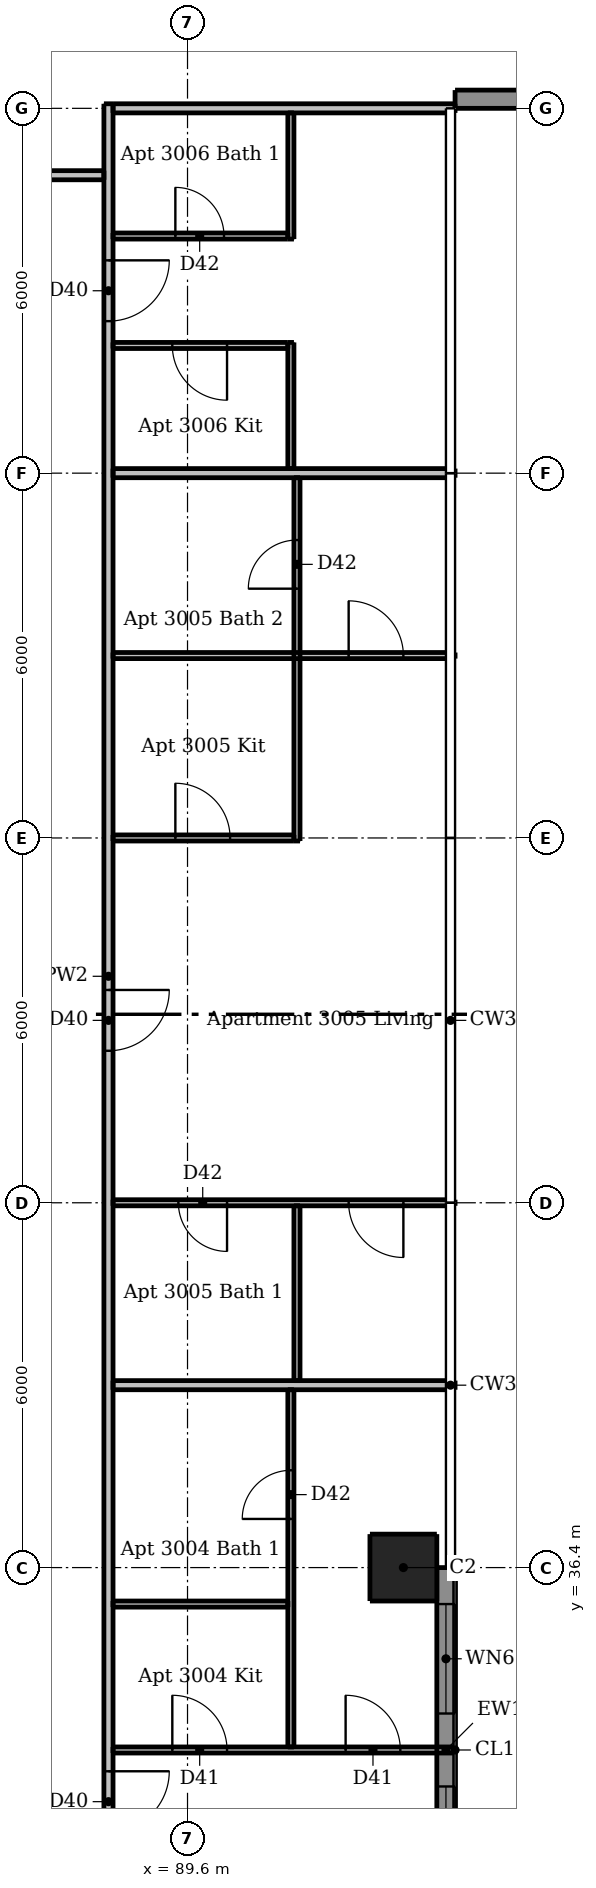
"""IFC4 building model, lengths in metres.
Left out: names, types, materials, properties, quantities, classifications, styles, units other than length and angle.
Written with IfcOpenShell. Run it as: python <this file> out.ifc"""

import sys

from ifc_helpers import new_model, si_unit, direction, frame, frame_2d, origin, origin_2d, place, context, subcontext, project, spatial, rectangle, extrude, element, fill, save


model = new_model("IFC4")
c1 = context("Model", 3, precision=1e-05, world=origin(), true_north=direction((0.0, 1.0)))
c2 = subcontext(c1, "Body", "Model", "MODEL_VIEW")
j1 = project(units=[si_unit("LENGTHUNIT", "METRE"), si_unit("PLANEANGLEUNIT", "RADIAN")], contexts=[c1])
p1 = place(None, origin())
s1 = spatial("IfcSite", under=j1, at=p1, CompositionType="ELEMENT")
p2 = place(p1, origin())
s2 = spatial("IfcBuilding", under=s1, at=p2, CompositionType="ELEMENT")
p3 = place(p2, frame((0.0, 0.0, 111.7)))
s3 = spatial("IfcBuildingStorey", under=s2, at=p3, CompositionType="ELEMENT", Elevation=111.7)
p4 = place(p3, frame((93.15, 36.4, 0.0), z_axis=(0.0, 0.0, 1.0), x_axis=(1.0, 0.0, 0.0)))
e1 = element("IfcColumn", 1, at=p4, inside=s3, PredefinedType="COLUMN", context=c2, shape_type="SweptSolid", body=[
    extrude(rectangle(XDim=1.1, YDim=1.1, at=origin_2d()), origin(), (0.0, 0.0, 1.0), 3.05),
])
p5 = place(p3, frame((94.0, 60.55, 0.0), z_axis=(0.0, 0.0, 1.0), x_axis=(1.0, 0.0, 0.0)))
e2 = element("IfcWall", 2, at=p5, inside=s3, PredefinedType="SOLIDWALL", context=c2, shape_type="SweptSolid", body=[
    extrude(rectangle(XDim=4.6, YDim=0.3, at=frame_2d((2.3, 0.0))), origin(), (0.0, 0.0, 1.0), 3.05),
])
p6 = place(p5, frame((1.1, 0.0, 0.15)))
e3 = element("IfcOpeningElement", 3, at=p6, cuts=e2, PredefinedType="OPENING", context=c2, shape_type="SweptSolid", body=[
    extrude(rectangle(XDim=2.4, YDim=2.1, at=frame_2d((1.2, 1.05))), frame((0.0, 0.16, 0.0), z_axis=(0.0, -1.0, 0.0), x_axis=(1.0, 0.0, 0.0)), (0.0, 0.0, 1.0), 0.32),
])
p7 = place(p3, frame((93.85, 30.4, 0.0), z_axis=(0.0, 0.0, 1.0), x_axis=(0.0, 1.0, 0.0)))
e4 = element("IfcWall", 4, at=p7, inside=s3, PredefinedType="SOLIDWALL", context=c2, shape_type="SweptSolid", body=[
    extrude(rectangle(XDim=6.0, YDim=0.3, at=frame_2d((3.0, 0.0))), origin(), (0.0, 0.0, 1.0), 3.05),
])
p8 = place(p7, frame((0.6, 0.0, 0.15)))
e5 = element("IfcOpeningElement", 5, at=p8, cuts=e4, PredefinedType="OPENING", context=c2, shape_type="SweptSolid", body=[
    extrude(rectangle(XDim=1.8, YDim=2.1, at=frame_2d((0.9, 1.05))), frame((0.0, 0.16, 0.0), z_axis=(0.0, -1.0, 0.0), x_axis=(1.0, 0.0, 0.0)), (0.0, 0.0, 1.0), 0.32),
])
p9 = place(p7, frame((3.6, 0.0, 0.15)))
e6 = element("IfcOpeningElement", 6, at=p9, cuts=e4, PredefinedType="OPENING", context=c2, shape_type="SweptSolid", body=[
    extrude(rectangle(XDim=1.8, YDim=2.1, at=frame_2d((0.9, 1.05))), frame((0.0, 0.16, 0.0), z_axis=(0.0, -1.0, 0.0), x_axis=(1.0, 0.0, 0.0)), (0.0, 0.0, 1.0), 0.32),
])
p10 = place(p3, frame((91.3, 33.45, 0.0), z_axis=(0.0, 0.0, 1.0), x_axis=(0.0, 1.0, 0.0)))
e7 = element("IfcWall", 7, at=p10, inside=s3, PredefinedType="PARTITIONING", context=c2, shape_type="SweptSolid", body=[
    extrude(rectangle(XDim=5.875, YDim=0.1, at=frame_2d((2.938, 0.0))), origin(), (0.0, 0.0, 1.0), 3.05),
])
p11 = place(p10, frame((3.75, 0.0, 0.0)))
e8 = element("IfcOpeningElement", 8, at=p11, cuts=e7, PredefinedType="OPENING", context=c2, shape_type="SweptSolid", body=[
    extrude(rectangle(XDim=0.8, YDim=2.1, at=frame_2d((0.4, 1.05))), frame((0.0, 0.06, 0.0), z_axis=(0.0, -1.0, 0.0), x_axis=(1.0, 0.0, 0.0)), (0.0, 0.0, 1.0), 0.12),
])
for number, where, z_axis, x_axis in (
    (9, (91.3, 54.475, 0.0), (0.0, 0.0, 1.0), (0.0, 1.0, 0.0)),
    (10, (91.3, 58.25, 0.0), (0.0, 0.0, 1.0), (0.0, 1.0, 0.0)),
):
    element("IfcWall", number, at=place(p3, frame(where, z_axis=z_axis, x_axis=x_axis)), inside=s3, PredefinedType="PARTITIONING", context=c2, shape_type="SweptSolid", body=[
        extrude(rectangle(XDim=2.075, YDim=0.1, at=frame_2d((1.038, 0.0))), origin(), (0.0, 0.0, 1.0), 3.05),
    ])
p12 = place(p3, frame((91.4, 39.475, 0.0), z_axis=(0.0, 0.0, 1.0), x_axis=(0.0, 1.0, 0.0)))
e11 = element("IfcWall", 11, at=p12, inside=s3, PredefinedType="PARTITIONING", context=c2, shape_type="SweptSolid", body=[
    extrude(rectangle(XDim=2.875, YDim=0.1, at=frame_2d((1.438, 0.0))), origin(), (0.0, 0.0, 1.0), 3.05),
])
p13 = place(p3, frame((91.4, 48.35, 0.0), z_axis=(0.0, 0.0, 1.0), x_axis=(0.0, 1.0, 0.0)))
e12 = element("IfcWall", 12, at=p13, inside=s3, PredefinedType="PARTITIONING", context=c2, shape_type="SweptSolid", body=[
    extrude(rectangle(XDim=5.975, YDim=0.1, at=frame_2d((2.987, 0.0))), origin(), (0.0, 0.0, 1.0), 3.05),
])
p14 = place(p13, frame((4.15, 0.0, 0.0)))
e13 = element("IfcOpeningElement", 13, at=p14, cuts=e12, PredefinedType="OPENING", context=c2, shape_type="SweptSolid", body=[
    extrude(rectangle(XDim=0.8, YDim=2.1, at=frame_2d((0.4, 1.05))), frame((0.0, 0.06, 0.0), z_axis=(0.0, -1.0, 0.0), x_axis=(1.0, 0.0, 0.0)), (0.0, 0.0, 1.0), 0.12),
])
p15 = place(p3, frame((88.375, 58.3, 0.0), z_axis=(0.0, 0.0, 1.0), x_axis=(1.0, 0.0, 0.0)))
e14 = element("IfcWall", 14, at=p15, inside=s3, PredefinedType="PARTITIONING", context=c2, shape_type="SweptSolid", body=[
    extrude(rectangle(XDim=2.875, YDim=0.1, at=frame_2d((1.438, 0.0))), origin(), (0.0, 0.0, 1.0), 3.05),
])
p16 = place(p15, frame((1.025, 0.0, 0.0)))
e15 = element("IfcOpeningElement", 15, at=p16, cuts=e14, PredefinedType="OPENING", context=c2, shape_type="SweptSolid", body=[
    extrude(rectangle(XDim=0.8, YDim=2.1, at=frame_2d((0.4, 1.05))), frame((0.0, 0.06, 0.0), z_axis=(0.0, -1.0, 0.0), x_axis=(1.0, 0.0, 0.0)), (0.0, 0.0, 1.0), 0.12),
])
p17 = place(p3, frame((91.25, 56.5, 0.0), z_axis=(0.0, 0.0, 1.0), x_axis=(-1.0, 0.0, 0.0)))
e16 = element("IfcWall", 16, at=p17, inside=s3, PredefinedType="PARTITIONING", context=c2, shape_type="SweptSolid", body=[
    extrude(rectangle(XDim=2.875, YDim=0.1, at=frame_2d((1.438, 0.0))), origin(), (0.0, 0.0, 1.0), 3.05),
])
p18 = place(p17, frame((1.0, 0.0, 0.0)))
e17 = element("IfcOpeningElement", 17, at=p18, cuts=e16, PredefinedType="OPENING", context=c2, shape_type="SweptSolid", body=[
    extrude(rectangle(XDim=0.9, YDim=2.1, at=frame_2d((0.45, 1.05))), frame((0.0, 0.06, 0.0), z_axis=(0.0, -1.0, 0.0), x_axis=(1.0, 0.0, 0.0)), (0.0, 0.0, 1.0), 0.12),
])
p19 = place(p3, frame((88.375, 51.4, 0.0), z_axis=(0.0, 0.0, 1.0), x_axis=(1.0, 0.0, 0.0)))
e18 = element("IfcWall", 18, at=p19, inside=s3, PredefinedType="PARTITIONING", context=c2, shape_type="SweptSolid", body=[
    extrude(rectangle(XDim=5.625, YDim=0.1, at=frame_2d((2.812, 0.0))), origin(), (0.0, 0.0, 1.0), 3.05),
])
p20 = place(p19, frame((3.875, 0.0, 0.0)))
e19 = element("IfcOpeningElement", 19, at=p20, cuts=e18, PredefinedType="OPENING", context=c2, shape_type="SweptSolid", body=[
    extrude(rectangle(XDim=0.9, YDim=2.1, at=frame_2d((0.45, 1.05))), frame((0.0, 0.06, 0.0), z_axis=(0.0, -1.0, 0.0), x_axis=(1.0, 0.0, 0.0)), (0.0, 0.0, 1.0), 0.12),
])
p21 = place(p3, frame((88.375, 48.4, 0.0), z_axis=(0.0, 0.0, 1.0), x_axis=(1.0, 0.0, 0.0)))
e20 = element("IfcWall", 20, at=p21, inside=s3, PredefinedType="PARTITIONING", context=c2, shape_type="SweptSolid", body=[
    extrude(rectangle(XDim=2.975, YDim=0.1, at=frame_2d((1.488, 0.0))), origin(), (0.0, 0.0, 1.0), 2.516),
])
p22 = place(p21, frame((1.025, 0.0, 0.0)))
e21 = element("IfcOpeningElement", 21, at=p22, cuts=e20, PredefinedType="OPENING", context=c2, shape_type="SweptSolid", body=[
    extrude(rectangle(XDim=0.9, YDim=2.1, at=frame_2d((0.45, 1.05))), frame((0.0, 0.06, 0.0), z_axis=(0.0, -1.0, 0.0), x_axis=(1.0, 0.0, 0.0)), (0.0, 0.0, 1.0), 0.12),
])
p23 = place(p3, frame((94.0, 42.4, 0.0), z_axis=(0.0, 0.0, 1.0), x_axis=(-1.0, 0.0, 0.0)))
e22 = element("IfcWall", 22, at=p23, inside=s3, PredefinedType="PARTITIONING", context=c2, shape_type="SweptSolid", body=[
    extrude(rectangle(XDim=5.625, YDim=0.1, at=frame_2d((2.812, 0.0))), origin(), (0.0, 0.0, 1.0), 2.516),
])
p24 = place(p23, frame((0.85, 0.0, 0.0)))
e23 = element("IfcOpeningElement", 23, at=p24, cuts=e22, PredefinedType="OPENING", context=c2, shape_type="SweptSolid", body=[
    extrude(rectangle(XDim=0.9, YDim=2.1, at=frame_2d((0.45, 1.05))), frame((0.0, 0.06, 0.0), z_axis=(0.0, -1.0, 0.0), x_axis=(1.0, 0.0, 0.0)), (0.0, 0.0, 1.0), 0.12),
])
p25 = place(p23, frame((3.75, 0.0, 0.0)))
e24 = element("IfcOpeningElement", 24, at=p25, cuts=e22, PredefinedType="OPENING", context=c2, shape_type="SweptSolid", body=[
    extrude(rectangle(XDim=0.8, YDim=2.1, at=frame_2d((0.4, 1.05))), frame((0.0, 0.06, 0.0), z_axis=(0.0, -1.0, 0.0), x_axis=(1.0, 0.0, 0.0)), (0.0, 0.0, 1.0), 0.12),
])
p26 = place(p3, frame((88.375, 35.8, 0.0), z_axis=(0.0, 0.0, 1.0), x_axis=(1.0, 0.0, 0.0)))
e25 = element("IfcWall", 25, at=p26, inside=s3, PredefinedType="PARTITIONING", context=c2, shape_type="SweptSolid", body=[
    extrude(rectangle(XDim=2.875, YDim=0.1, at=frame_2d((1.438, 0.0))), origin(), (0.0, 0.0, 1.0), 3.05),
])
p27 = place(p3, frame((88.375, 33.4, 0.0), z_axis=(0.0, 0.0, 1.0), x_axis=(1.0, 0.0, 0.0)))
e26 = element("IfcWall", 26, at=p27, inside=s3, PredefinedType="PARTITIONING", context=c2, shape_type="SweptSolid", body=[
    extrude(rectangle(XDim=5.625, YDim=0.1, at=frame_2d((2.812, 0.0))), origin(), (0.0, 0.0, 1.0), 3.05),
])
p28 = place(p27, frame((0.975, 0.0, 0.0)))
e27 = element("IfcOpeningElement", 27, at=p28, cuts=e26, PredefinedType="OPENING", context=c2, shape_type="SweptSolid", body=[
    extrude(rectangle(XDim=0.9, YDim=2.1, at=frame_2d((0.45, 1.05))), frame((0.0, 0.06, 0.0), z_axis=(0.0, -1.0, 0.0), x_axis=(1.0, 0.0, 0.0)), (0.0, 0.0, 1.0), 0.12),
])
p29 = place(p27, frame((3.825, 0.0, 0.0)))
e28 = element("IfcOpeningElement", 28, at=p29, cuts=e26, PredefinedType="OPENING", context=c2, shape_type="SweptSolid", body=[
    extrude(rectangle(XDim=0.9, YDim=2.1, at=frame_2d((0.45, 1.05))), frame((0.0, 0.06, 0.0), z_axis=(0.0, -1.0, 0.0), x_axis=(1.0, 0.0, 0.0)), (0.0, 0.0, 1.0), 0.12),
])
p30 = place(p3, frame((88.3, 60.475, 0.0), z_axis=(0.0, 0.0, 1.0), x_axis=(0.0, -1.0, 0.0)))
e29 = element("IfcWall", 29, at=p30, inside=s3, PredefinedType="PARTITIONING", context=c2, shape_type="SweptSolid", body=[
    extrude(rectangle(XDim=28.7, YDim=0.15, at=frame_2d((14.35, 0.0))), origin(), (0.0, 0.0, 1.0), 3.05),
])
p31 = place(p30, frame((27.425, 0.0, 0.0)))
e30 = element("IfcOpeningElement", 30, at=p31, cuts=e29, PredefinedType="OPENING", context=c2, shape_type="SweptSolid", body=[
    extrude(rectangle(XDim=1.0, YDim=2.1, at=frame_2d((0.5, 1.05))), frame((0.0, 0.085, 0.0), z_axis=(0.0, -1.0, 0.0), x_axis=(1.0, 0.0, 0.0)), (0.0, 0.0, 1.0), 0.17),
])
p32 = place(p30, frame((14.575, 0.0, 0.0)))
e31 = element("IfcOpeningElement", 31, at=p32, cuts=e29, PredefinedType="OPENING", context=c2, shape_type="SweptSolid", body=[
    extrude(rectangle(XDim=1.0, YDim=2.1, at=frame_2d((0.5, 1.05))), frame((0.0, 0.085, 0.0), z_axis=(0.0, -1.0, 0.0), x_axis=(1.0, 0.0, 0.0)), (0.0, 0.0, 1.0), 0.17),
])
p33 = place(p30, frame((2.575, 0.0, 0.0)))
e32 = element("IfcOpeningElement", 32, at=p33, cuts=e29, PredefinedType="OPENING", context=c2, shape_type="SweptSolid", body=[
    extrude(rectangle(XDim=1.0, YDim=2.1, at=frame_2d((0.5, 1.05))), frame((0.0, 0.085, 0.0), z_axis=(0.0, -1.0, 0.0), x_axis=(1.0, 0.0, 0.0)), (0.0, 0.0, 1.0), 0.17),
])
p34 = place(p3, frame((88.375, 60.4, 0.0), z_axis=(0.0, 0.0, 1.0), x_axis=(1.0, 0.0, 0.0)))
e33 = element("IfcWall", 33, at=p34, inside=s3, PredefinedType="PARTITIONING", context=c2, shape_type="SweptSolid", body=[
    extrude(rectangle(XDim=5.625, YDim=0.15, at=frame_2d((2.812, 0.0))), origin(), (0.0, 0.0, 1.0), 2.516),
])
p35 = place(p3, frame((59.675, 59.3, 0.0), z_axis=(0.0, 0.0, 1.0), x_axis=(1.0, 0.0, 0.0)))
e34 = element("IfcWall", 34, at=p35, inside=s3, PredefinedType="PARTITIONING", context=c2, shape_type="SweptSolid", body=[
    extrude(rectangle(XDim=28.55, YDim=0.15, at=frame_2d((14.275, 0.0))), origin(), (0.0, 0.0, 1.0), 3.05),
])
p36 = place(p35, frame((8.975, 0.0, 0.0)))
e35 = element("IfcOpeningElement", 35, at=p36, cuts=e34, PredefinedType="OPENING", context=c2, shape_type="SweptSolid", body=[
    extrude(rectangle(XDim=1.0, YDim=2.1, at=frame_2d((0.5, 1.05))), frame((0.0, 0.085, 0.0), z_axis=(0.0, -1.0, 0.0), x_axis=(1.0, 0.0, 0.0)), (0.0, 0.0, 1.0), 0.17),
])
p37 = place(p35, frame((25.775, 0.0, 0.0)))
e36 = element("IfcOpeningElement", 36, at=p37, cuts=e34, PredefinedType="OPENING", context=c2, shape_type="SweptSolid", body=[
    extrude(rectangle(XDim=1.0, YDim=2.1, at=frame_2d((0.5, 1.05))), frame((0.0, 0.085, 0.0), z_axis=(0.0, -1.0, 0.0), x_axis=(1.0, 0.0, 0.0)), (0.0, 0.0, 1.0), 0.17),
])
p38 = place(p3, frame((88.375, 54.4, 0.0), z_axis=(0.0, 0.0, 1.0), x_axis=(1.0, 0.0, 0.0)))
e37 = element("IfcWall", 37, at=p38, inside=s3, PredefinedType="PARTITIONING", context=c2, shape_type="SweptSolid", body=[
    extrude(rectangle(XDim=5.625, YDim=0.15, at=frame_2d((2.812, 0.0))), origin(), (0.0, 0.0, 1.0), 2.516),
])
p39 = place(p3, frame((88.375, 39.4, 0.0), z_axis=(0.0, 0.0, 1.0), x_axis=(1.0, 0.0, 0.0)))
e38 = element("IfcWall", 38, at=p39, inside=s3, PredefinedType="PARTITIONING", context=c2, shape_type="SweptSolid", body=[
    extrude(rectangle(XDim=5.625, YDim=0.15, at=frame_2d((2.812, 0.0))), origin(), (0.0, 0.0, 1.0), 3.05),
])
p40 = place(p8, origin())
e39 = element("IfcWindow", 39, at=p40, inside=s3, PartitioningType="DOUBLE_PANEL_VERTICAL", PredefinedType="WINDOW", context=c2, shape_type="SweptSolid", body=[
    extrude(rectangle(XDim=1.8, YDim=2.1, at=frame_2d((0.9, 1.05))), frame((0.0, 0.03, 0.0), z_axis=(0.0, -1.0, 0.0), x_axis=(1.0, 0.0, 0.0)), (0.0, 0.0, 1.0), 0.06),
])
fill(e5, e39)
p41 = place(p9, origin())
e40 = element("IfcWindow", 40, at=p41, inside=s3, PartitioningType="DOUBLE_PANEL_VERTICAL", PredefinedType="WINDOW", context=c2, shape_type="SweptSolid", body=[
    extrude(rectangle(XDim=1.8, YDim=2.1, at=frame_2d((0.9, 1.05))), frame((0.0, 0.03, 0.0), z_axis=(0.0, -1.0, 0.0), x_axis=(1.0, 0.0, 0.0)), (0.0, 0.0, 1.0), 0.06),
])
fill(e6, e40)
p42 = place(p31, origin())
e41 = element("IfcDoor", 41, at=p42, inside=s3, OperationType="SINGLE_SWING_LEFT", PredefinedType="DOOR", context=c2, shape_type="SweptSolid", body=[
    extrude(rectangle(XDim=1.0, YDim=2.1, at=frame_2d((0.5, 1.05))), frame((0.0, 0.025, 0.0), z_axis=(0.0, -1.0, 0.0), x_axis=(1.0, 0.0, 0.0)), (0.0, 0.0, 1.0), 0.05),
])
fill(e30, e41)
p43 = place(p28, origin())
e42 = element("IfcDoor", 42, at=p43, inside=s3, OperationType="SINGLE_SWING_LEFT", PredefinedType="DOOR", context=c2, shape_type="SweptSolid", body=[
    extrude(rectangle(XDim=0.9, YDim=2.1, at=frame_2d((0.45, 1.05))), frame((0.0, 0.025, 0.0), z_axis=(0.0, -1.0, 0.0), x_axis=(1.0, 0.0, 0.0)), (0.0, 0.0, 1.0), 0.05),
])
fill(e27, e42)
p44 = place(p29, origin())
e43 = element("IfcDoor", 43, at=p44, inside=s3, OperationType="SINGLE_SWING_LEFT", PredefinedType="DOOR", context=c2, shape_type="SweptSolid", body=[
    extrude(rectangle(XDim=0.9, YDim=2.1, at=frame_2d((0.45, 1.05))), frame((0.0, 0.025, 0.0), z_axis=(0.0, -1.0, 0.0), x_axis=(1.0, 0.0, 0.0)), (0.0, 0.0, 1.0), 0.05),
])
fill(e28, e43)
p45 = place(p11, origin())
e44 = element("IfcDoor", 44, at=p45, inside=s3, OperationType="SINGLE_SWING_LEFT", PredefinedType="DOOR", context=c2, shape_type="SweptSolid", body=[
    extrude(rectangle(XDim=0.8, YDim=2.1, at=frame_2d((0.4, 1.05))), frame((0.0, 0.025, 0.0), z_axis=(0.0, -1.0, 0.0), x_axis=(1.0, 0.0, 0.0)), (0.0, 0.0, 1.0), 0.05),
])
fill(e8, e44)
p46 = place(p32, origin())
e45 = element("IfcDoor", 45, at=p46, inside=s3, OperationType="SINGLE_SWING_LEFT", PredefinedType="DOOR", context=c2, shape_type="SweptSolid", body=[
    extrude(rectangle(XDim=1.0, YDim=2.1, at=frame_2d((0.5, 1.05))), frame((0.0, 0.025, 0.0), z_axis=(0.0, -1.0, 0.0), x_axis=(1.0, 0.0, 0.0)), (0.0, 0.0, 1.0), 0.05),
])
fill(e31, e45)
p47 = place(p22, origin())
e46 = element("IfcDoor", 46, at=p47, inside=s3, OperationType="SINGLE_SWING_LEFT", PredefinedType="DOOR", context=c2, shape_type="SweptSolid", body=[
    extrude(rectangle(XDim=0.9, YDim=2.1, at=frame_2d((0.45, 1.05))), frame((0.0, 0.025, 0.0), z_axis=(0.0, -1.0, 0.0), x_axis=(1.0, 0.0, 0.0)), (0.0, 0.0, 1.0), 0.05),
])
fill(e21, e46)
p48 = place(p24, origin())
e47 = element("IfcDoor", 47, at=p48, inside=s3, OperationType="SINGLE_SWING_LEFT", PredefinedType="DOOR", context=c2, shape_type="SweptSolid", body=[
    extrude(rectangle(XDim=0.9, YDim=2.1, at=frame_2d((0.45, 1.05))), frame((0.0, 0.025, 0.0), z_axis=(0.0, -1.0, 0.0), x_axis=(1.0, 0.0, 0.0)), (0.0, 0.0, 1.0), 0.05),
])
fill(e23, e47)
p49 = place(p25, origin())
e48 = element("IfcDoor", 48, at=p49, inside=s3, OperationType="SINGLE_SWING_LEFT", PredefinedType="DOOR", context=c2, shape_type="SweptSolid", body=[
    extrude(rectangle(XDim=0.8, YDim=2.1, at=frame_2d((0.4, 1.05))), frame((0.0, 0.025, 0.0), z_axis=(0.0, -1.0, 0.0), x_axis=(1.0, 0.0, 0.0)), (0.0, 0.0, 1.0), 0.05),
])
fill(e24, e48)
p50 = place(p20, origin())
e49 = element("IfcDoor", 49, at=p50, inside=s3, OperationType="SINGLE_SWING_LEFT", PredefinedType="DOOR", context=c2, shape_type="SweptSolid", body=[
    extrude(rectangle(XDim=0.9, YDim=2.1, at=frame_2d((0.45, 1.05))), frame((0.0, 0.025, 0.0), z_axis=(0.0, -1.0, 0.0), x_axis=(1.0, 0.0, 0.0)), (0.0, 0.0, 1.0), 0.05),
])
fill(e19, e49)
p51 = place(p14, origin())
e50 = element("IfcDoor", 50, at=p51, inside=s3, OperationType="SINGLE_SWING_LEFT", PredefinedType="DOOR", context=c2, shape_type="SweptSolid", body=[
    extrude(rectangle(XDim=0.8, YDim=2.1, at=frame_2d((0.4, 1.05))), frame((0.0, 0.025, 0.0), z_axis=(0.0, -1.0, 0.0), x_axis=(1.0, 0.0, 0.0)), (0.0, 0.0, 1.0), 0.05),
])
fill(e13, e50)
p52 = place(p33, origin())
e51 = element("IfcDoor", 51, at=p52, inside=s3, OperationType="SINGLE_SWING_LEFT", PredefinedType="DOOR", context=c2, shape_type="SweptSolid", body=[
    extrude(rectangle(XDim=1.0, YDim=2.1, at=frame_2d((0.5, 1.05))), frame((0.0, 0.025, 0.0), z_axis=(0.0, -1.0, 0.0), x_axis=(1.0, 0.0, 0.0)), (0.0, 0.0, 1.0), 0.05),
])
fill(e32, e51)
p53 = place(p18, origin())
e52 = element("IfcDoor", 52, at=p53, inside=s3, OperationType="SINGLE_SWING_LEFT", PredefinedType="DOOR", context=c2, shape_type="SweptSolid", body=[
    extrude(rectangle(XDim=0.9, YDim=2.1, at=frame_2d((0.45, 1.05))), frame((0.0, 0.025, 0.0), z_axis=(0.0, -1.0, 0.0), x_axis=(1.0, 0.0, 0.0)), (0.0, 0.0, 1.0), 0.05),
])
fill(e17, e52)
p54 = place(p16, origin())
e53 = element("IfcDoor", 53, at=p54, inside=s3, OperationType="SINGLE_SWING_LEFT", PredefinedType="DOOR", context=c2, shape_type="SweptSolid", body=[
    extrude(rectangle(XDim=0.8, YDim=2.1, at=frame_2d((0.4, 1.05))), frame((0.0, 0.025, 0.0), z_axis=(0.0, -1.0, 0.0), x_axis=(1.0, 0.0, 0.0)), (0.0, 0.0, 1.0), 0.05),
])
fill(e15, e53)
save(model, sys.argv[1])
